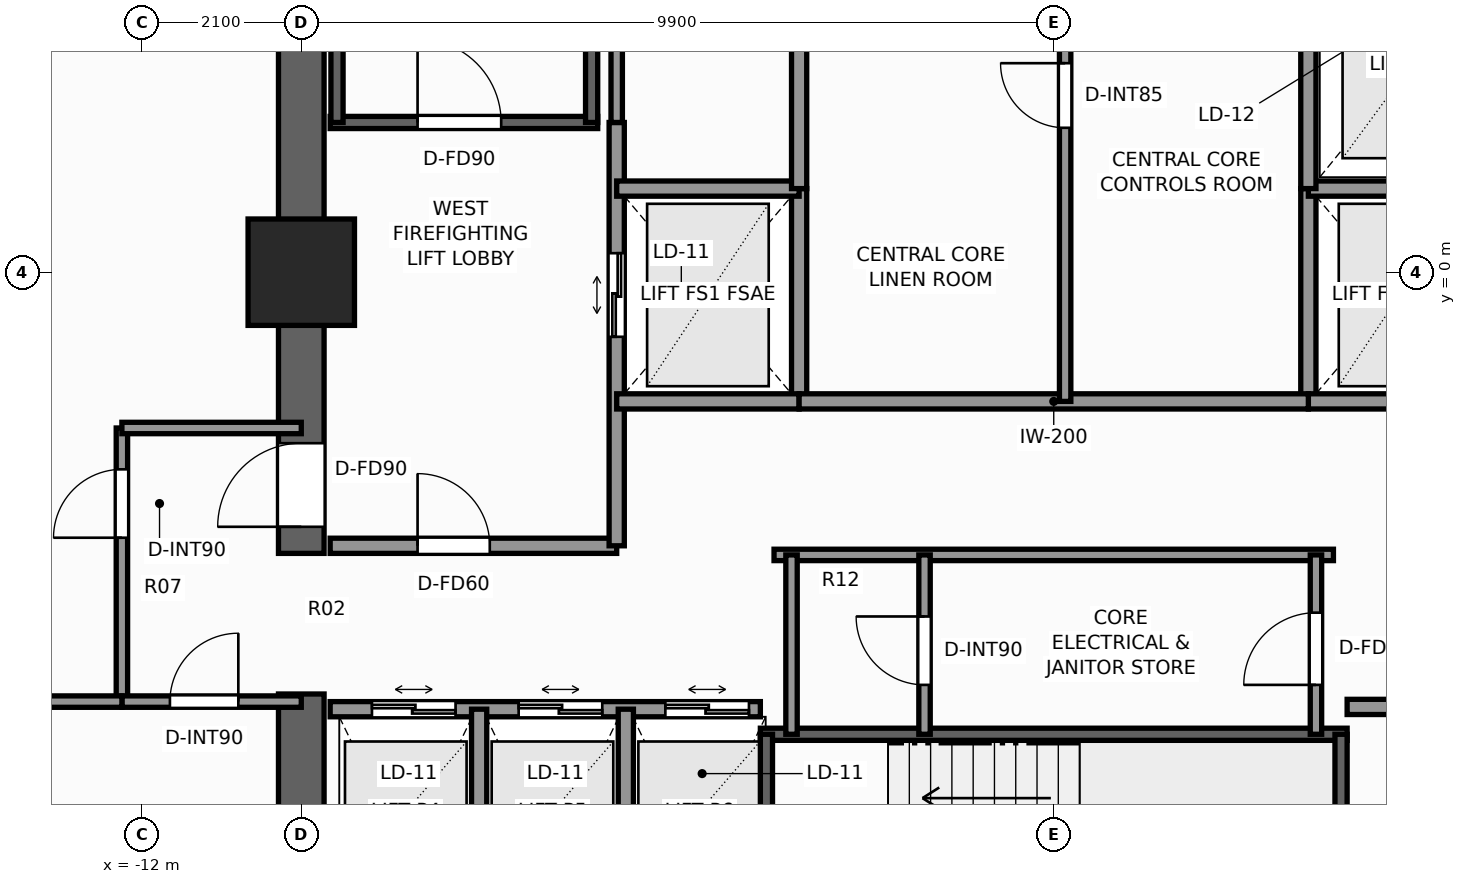
"""IFC4 building model, lengths in metres.
Left out: names, types, materials, properties, quantities, classifications, styles, units other than length and angle.
Written with IfcOpenShell. Run it as: python <this file> out.ifc"""

import sys

from ifc_helpers import new_model, si_unit, direction, frame, frame_2d, origin, origin_2d, place, context, subcontext, project, spatial, rectangle, extrude, element, fill, save


model = new_model("IFC4")
c1 = context("Model", 3, precision=1e-05, world=origin(), true_north=direction((0.0, 1.0)))
c2 = subcontext(c1, "Body", "Model", "MODEL_VIEW")
j1 = project(units=[si_unit("LENGTHUNIT", "METRE"), si_unit("PLANEANGLEUNIT", "RADIAN")], contexts=[c1])
p1 = place(None, origin())
s1 = spatial("IfcSite", under=j1, at=p1, CompositionType="ELEMENT")
p2 = place(p1, origin())
s2 = spatial("IfcBuilding", under=s1, at=p2, CompositionType="ELEMENT")
p3 = place(p2, frame((0.0, 0.0, 101.9)))
s3 = spatial("IfcBuildingStorey", under=s2, at=p3, CompositionType="ELEMENT", Elevation=101.9)
p4 = place(p3, frame((-9.9, -9.6, 0.0), z_axis=(0.0, 0.0, 1.0), x_axis=(0.0, 1.0, 0.0)))
e1 = element("IfcWall", 1, at=p4, inside=s3, PredefinedType="SHEAR", context=c2, shape_type="SweptSolid", body=[
    extrude(rectangle(XDim=4.05, YDim=0.6, at=frame_2d((2.025, 0.0))), origin(), (0.0, 0.0, 1.0), 3.3),
])
p5 = place(p3, frame((-9.9, -3.7, 0.0), z_axis=(0.0, 0.0, 1.0), x_axis=(0.0, 1.0, 0.0)))
e2 = element("IfcWall", 2, at=p5, inside=s3, PredefinedType="SHEAR", context=c2, shape_type="SweptSolid", body=[
    extrude(rectangle(XDim=13.3, YDim=0.6, at=frame_2d((6.65, 0.0))), origin(), (0.0, 0.0, 1.0), 3.3),
])
p6 = place(p5, frame((0.35, 0.0, 0.0)))
e3 = element("IfcOpeningElement", 3, at=p6, cuts=e2, PredefinedType="OPENING", context=c2, shape_type="SweptSolid", body=[
    extrude(rectangle(XDim=1.1, YDim=2.2, at=frame_2d((0.55, 1.1))), frame((0.0, 0.31, 0.0), z_axis=(0.0, -1.0, 0.0), x_axis=(1.0, 0.0, 0.0)), (0.0, 0.0, 1.0), 0.62),
])
p7 = place(p3, frame((-9.9, 0.0, 0.0), z_axis=(0.0, 0.0, 1.0), x_axis=(1.0, 0.0, 0.0)))
e4 = element("IfcColumn", 4, at=p7, inside=s3, PredefinedType="COLUMN", context=c2, shape_type="SweptSolid", body=[
    extrude(rectangle(XDim=1.4, YDim=1.4, at=origin_2d()), origin(), (0.0, 0.0, 1.0), 3.3),
])
p8 = place(p3, frame((-9.52, 1.97, 0.0), z_axis=(0.0, 0.0, 1.0), x_axis=(1.0, 0.0, 0.0)))
e5 = element("IfcWall", 5, at=p8, inside=s3, PredefinedType="SHEAR", context=c2, shape_type="SweptSolid", body=[
    extrude(rectangle(XDim=3.52, YDim=0.16, at=frame_2d((1.76, 0.0))), origin(), (0.0, 0.0, 1.0), 3.3),
])
p9 = place(p8, frame((1.15, 0.0, 0.0)))
e6 = element("IfcOpeningElement", 6, at=p9, cuts=e5, PredefinedType="OPENING", context=c2, shape_type="SweptSolid", body=[
    extrude(rectangle(XDim=1.1, YDim=2.2, at=frame_2d((0.55, 1.1))), frame((0.0, 0.09, 0.0), z_axis=(0.0, -1.0, 0.0), x_axis=(1.0, 0.0, 0.0)), (0.0, 0.0, 1.0), 0.18),
])
for number, where, z_axis, x_axis in (
    (7, (-9.43, 1.97, 0.0), (0.0, 0.0, 1.0), (0.0, 1.0, 0.0)),
    (8, (-6.08, 1.97, 0.0), (0.0, 0.0, 1.0), (0.0, 1.0, 0.0)),
):
    element("IfcWall", number, at=place(p3, frame(where, z_axis=z_axis, x_axis=x_axis)), inside=s3, PredefinedType="SHEAR", context=c2, shape_type="SweptSolid", body=[
        extrude(rectangle(XDim=7.56, YDim=0.16, at=frame_2d((3.78, 0.0))), origin(), (0.0, 0.0, 1.0), 3.3),
    ])
p10 = place(p3, frame((-3.86, -6.08, 0.0), z_axis=(0.0, 0.0, 1.0), x_axis=(1.0, 0.0, 0.0)))
e9 = element("IfcWall", 9, at=p10, inside=s3, PredefinedType="SHEAR", context=c2, shape_type="SweptSolid", body=[
    extrude(rectangle(XDim=7.72, YDim=0.16, at=frame_2d((3.86, 0.0))), origin(), (0.0, 0.0, 1.0), 3.3),
])
for number, where, z_axis, x_axis in (
    (10, (-3.78, -9.43, 0.0), (0.0, 0.0, 1.0), (0.0, 1.0, 0.0)),
    (11, (3.78, -9.43, 0.0), (0.0, 0.0, 1.0), (0.0, 1.0, 0.0)),
):
    element("IfcWall", number, at=place(p3, frame(where, z_axis=z_axis, x_axis=x_axis)), inside=s3, PredefinedType="SHEAR", context=c2, shape_type="SweptSolid", body=[
        extrude(rectangle(XDim=3.35, YDim=0.16, at=frame_2d((1.675, 0.0))), origin(), (0.0, 0.0, 1.0), 3.3),
    ])
p11 = place(p3, frame((-9.52, -3.6, 0.0), z_axis=(0.0, 0.0, 1.0), x_axis=(1.0, 0.0, 0.0)))
e12 = element("IfcWall", 12, at=p11, inside=s3, PredefinedType="SOLIDWALL", context=c2, shape_type="SweptSolid", body=[
    extrude(rectangle(XDim=3.77, YDim=0.2, at=frame_2d((1.885, 0.0))), origin(), (0.0, 0.0, 1.0), 3.08),
])
p12 = place(p11, frame((1.15, 0.0, 0.0)))
e13 = element("IfcOpeningElement", 13, at=p12, cuts=e12, PredefinedType="OPENING", context=c2, shape_type="SweptSolid", body=[
    extrude(rectangle(XDim=0.95, YDim=2.06, at=frame_2d((0.475, 1.03))), frame((0.0, 0.11, 0.0), z_axis=(0.0, -1.0, 0.0), x_axis=(1.0, 0.0, 0.0)), (0.0, 0.0, 1.0), 0.22),
])
p13 = place(p3, frame((-5.75, -3.6, 0.0), z_axis=(0.0, 0.0, 1.0), x_axis=(0.0, 1.0, 0.0)))
e14 = element("IfcWall", 14, at=p13, inside=s3, PredefinedType="SOLIDWALL", context=c2, shape_type="SweptSolid", body=[
    extrude(rectangle(XDim=5.57, YDim=0.2, at=frame_2d((2.785, 0.0))), origin(), (0.0, 0.0, 1.0), 3.08),
])
p14 = place(p13, frame((2.75, 0.0, 0.0)))
e15 = element("IfcOpeningElement", 15, at=p14, cuts=e14, PredefinedType="OPENING", context=c2, shape_type="SweptSolid", body=[
    extrude(rectangle(XDim=1.1, YDim=2.2, at=frame_2d((0.55, 1.1))), frame((0.0, 0.11, 0.0), z_axis=(0.0, -1.0, 0.0), x_axis=(1.0, 0.0, 0.0)), (0.0, 0.0, 1.0), 0.22),
])
p15 = place(p3, frame((-3.35, -1.7, 0.0), z_axis=(0.0, 0.0, 1.0), x_axis=(0.0, 1.0, 0.0)))
e16 = element("IfcWall", 16, at=p15, inside=s3, PredefinedType="SOLIDWALL", context=c2, shape_type="SweptSolid", body=[
    extrude(rectangle(XDim=2.8, YDim=0.2, at=frame_2d((1.4, 0.0))), origin(), (0.0, 0.0, 1.0), 3.08),
])
for number, where, z_axis, x_axis in (
    (17, (-5.75, -1.7, 0.0), (0.0, 0.0, 1.0), (1.0, 0.0, 0.0)),
    (18, (-5.75, 1.1, 0.0), (0.0, 0.0, 1.0), (1.0, 0.0, 0.0)),
):
    element("IfcWall", number, at=place(p3, frame(where, z_axis=z_axis, x_axis=x_axis)), inside=s3, PredefinedType="SOLIDWALL", context=c2, shape_type="SweptSolid", body=[
        extrude(rectangle(XDim=2.4, YDim=0.2, at=frame_2d((1.2, 0.0))), origin(), (0.0, 0.0, 1.0), 3.08),
    ])
p16 = place(p3, frame((3.35, -1.7, 0.0), z_axis=(0.0, 0.0, 1.0), x_axis=(0.0, 1.0, 0.0)))
e19 = element("IfcWall", 19, at=p16, inside=s3, PredefinedType="SOLIDWALL", context=c2, shape_type="SweptSolid", body=[
    extrude(rectangle(XDim=2.8, YDim=0.2, at=frame_2d((1.4, 0.0))), origin(), (0.0, 0.0, 1.0), 3.08),
])
for number, where, z_axis, x_axis in (
    (20, (3.35, -1.7, 0.0), (0.0, 0.0, 1.0), (1.0, 0.0, 0.0)),
    (21, (3.35, 1.1, 0.0), (0.0, 0.0, 1.0), (1.0, 0.0, 0.0)),
):
    element("IfcWall", number, at=place(p3, frame(where, z_axis=z_axis, x_axis=x_axis)), inside=s3, PredefinedType="SOLIDWALL", context=c2, shape_type="SweptSolid", body=[
        extrude(rectangle(XDim=2.4, YDim=0.2, at=frame_2d((1.2, 0.0))), origin(), (0.0, 0.0, 1.0), 3.08),
    ])
p17 = place(p3, frame((-9.52, -5.75, 0.0), z_axis=(0.0, 0.0, 1.0), x_axis=(1.0, 0.0, 0.0)))
e22 = element("IfcWall", 22, at=p17, inside=s3, PredefinedType="SOLIDWALL", context=c2, shape_type="SweptSolid", body=[
    extrude(rectangle(XDim=5.66, YDim=0.2, at=frame_2d((2.83, 0.0))), origin(), (0.0, 0.0, 1.0), 3.08),
])
p18 = place(p17, frame((0.55, 0.0, 0.0)))
e23 = element("IfcOpeningElement", 23, at=p18, cuts=e22, PredefinedType="OPENING", context=c2, shape_type="SweptSolid", body=[
    extrude(rectangle(XDim=1.1, YDim=2.2, at=frame_2d((0.55, 1.1))), frame((0.0, 0.11, 0.0), z_axis=(0.0, -1.0, 0.0), x_axis=(1.0, 0.0, 0.0)), (0.0, 0.0, 1.0), 0.22),
])
p19 = place(p17, frame((2.48, 0.0, 0.0)))
e24 = element("IfcOpeningElement", 24, at=p19, cuts=e22, PredefinedType="OPENING", context=c2, shape_type="SweptSolid", body=[
    extrude(rectangle(XDim=1.1, YDim=2.2, at=frame_2d((0.55, 1.1))), frame((0.0, 0.11, 0.0), z_axis=(0.0, -1.0, 0.0), x_axis=(1.0, 0.0, 0.0)), (0.0, 0.0, 1.0), 0.22),
])
p20 = place(p17, frame((4.41, 0.0, 0.0)))
e25 = element("IfcOpeningElement", 25, at=p20, cuts=e22, PredefinedType="OPENING", context=c2, shape_type="SweptSolid", body=[
    extrude(rectangle(XDim=1.1, YDim=2.2, at=frame_2d((0.55, 1.1))), frame((0.0, 0.11, 0.0), z_axis=(0.0, -1.0, 0.0), x_axis=(1.0, 0.0, 0.0)), (0.0, 0.0, 1.0), 0.22),
])
for number, where, z_axis, x_axis in (
    (26, (-7.56, -9.52, 0.0), (0.0, 0.0, 1.0), (0.0, 1.0, 0.0)),
    (27, (-5.63, -9.52, 0.0), (0.0, 0.0, 1.0), (0.0, 1.0, 0.0)),
):
    element("IfcWall", number, at=place(p3, frame(where, z_axis=z_axis, x_axis=x_axis)), inside=s3, PredefinedType="SOLIDWALL", context=c2, shape_type="SweptSolid", body=[
        extrude(rectangle(XDim=3.77, YDim=0.2, at=frame_2d((1.885, 0.0))), origin(), (0.0, 0.0, 1.0), 3.08),
    ])
p21 = place(p3, frame((3.86, -5.72, 0.0), z_axis=(0.0, 0.0, 1.0), x_axis=(1.0, 0.0, 0.0)))
e28 = element("IfcWall", 28, at=p21, inside=s3, PredefinedType="SOLIDWALL", context=c2, shape_type="SweptSolid", body=[
    extrude(rectangle(XDim=5.66, YDim=0.2, at=frame_2d((2.83, 0.0))), origin(), (0.0, 0.0, 1.0), 3.08),
])
p22 = place(p21, frame((1.2, 0.0, 0.0)))
e29 = element("IfcOpeningElement", 29, at=p22, cuts=e28, PredefinedType="OPENING", context=c2, shape_type="SweptSolid", body=[
    extrude(rectangle(XDim=0.95, YDim=2.06, at=frame_2d((0.475, 1.03))), frame((0.0, 0.11, 0.0), z_axis=(0.0, -1.0, 0.0), x_axis=(1.0, 0.0, 0.0)), (0.0, 0.0, 1.0), 0.22),
])
p23 = place(p3, frame((-3.35, -1.7, 0.0), z_axis=(0.0, 0.0, 1.0), x_axis=(1.0, 0.0, 0.0)))
e30 = element("IfcWall", 30, at=p23, inside=s3, PredefinedType="SOLIDWALL", context=c2, shape_type="SweptSolid", body=[
    extrude(rectangle(XDim=6.7, YDim=0.2, at=frame_2d((3.35, 0.0))), origin(), (0.0, 0.0, 1.0), 3.08),
])
for number, where, z_axis, x_axis in (
    (31, (-3.35, 1.1, 0.0), (0.0, 0.0, 1.0), (0.0, 1.0, 0.0)),
    (32, (3.35, 1.1, 0.0), (0.0, 0.0, 1.0), (0.0, 1.0, 0.0)),
):
    element("IfcWall", number, at=place(p3, frame(where, z_axis=z_axis, x_axis=x_axis)), inside=s3, PredefinedType="SOLIDWALL", context=c2, shape_type="SweptSolid", body=[
        extrude(rectangle(XDim=3.2, YDim=0.2, at=frame_2d((1.6, 0.0))), origin(), (0.0, 0.0, 1.0), 3.08),
    ])
p24 = place(p3, frame((0.15, -1.7, 0.0), z_axis=(0.0, 0.0, 1.0), x_axis=(0.0, 1.0, 0.0)))
e33 = element("IfcWall", 33, at=p24, inside=s3, PredefinedType="PARTITIONING", context=c2, shape_type="SweptSolid", body=[
    extrude(rectangle(XDim=6.0, YDim=0.15, at=frame_2d((3.0, 0.0))), origin(), (0.0, 0.0, 1.0), 3.08),
])
p25 = place(p24, frame((3.6, 0.0, 0.0)))
e34 = element("IfcOpeningElement", 34, at=p25, cuts=e33, PredefinedType="OPENING", context=c2, shape_type="SweptSolid", body=[
    extrude(rectangle(XDim=0.85, YDim=2.03, at=frame_2d((0.425, 1.015))), frame((0.0, 0.085, 0.0), z_axis=(0.0, -1.0, 0.0), x_axis=(1.0, 0.0, 0.0)), (0.0, 0.0, 1.0), 0.17),
])
p26 = place(p3, frame((-3.68, -3.72, 0.0), z_axis=(0.0, 0.0, 1.0), x_axis=(1.0, 0.0, 0.0)))
e35 = element("IfcWall", 35, at=p26, inside=s3, PredefinedType="PARTITIONING", context=c2, shape_type="SweptSolid", body=[
    extrude(rectangle(XDim=7.36, YDim=0.15, at=frame_2d((3.68, 0.0))), origin(), (0.0, 0.0, 1.0), 3.08),
])
p27 = place(p3, frame((3.45, -6.08, 0.0), z_axis=(0.0, 0.0, 1.0), x_axis=(0.0, 1.0, 0.0)))
e36 = element("IfcWall", 36, at=p27, inside=s3, PredefinedType="PARTITIONING", context=c2, shape_type="SweptSolid", body=[
    extrude(rectangle(XDim=2.36, YDim=0.15, at=frame_2d((1.18, 0.0))), origin(), (0.0, 0.0, 1.0), 3.08),
])
p28 = place(p27, frame((0.65, 0.0, 0.0)))
e37 = element("IfcOpeningElement", 37, at=p28, cuts=e36, PredefinedType="OPENING", context=c2, shape_type="SweptSolid", body=[
    extrude(rectangle(XDim=0.95, YDim=2.06, at=frame_2d((0.475, 1.03))), frame((0.0, 0.085, 0.0), z_axis=(0.0, -1.0, 0.0), x_axis=(1.0, 0.0, 0.0)), (0.0, 0.0, 1.0), 0.17),
])
p29 = place(p3, frame((-3.45, -6.08, 0.0), z_axis=(0.0, 0.0, 1.0), x_axis=(0.0, 1.0, 0.0)))
e38 = element("IfcWall", 38, at=p29, inside=s3, PredefinedType="PARTITIONING", context=c2, shape_type="SweptSolid", body=[
    extrude(rectangle(XDim=2.36, YDim=0.15, at=frame_2d((1.18, 0.0))), origin(), (0.0, 0.0, 1.0), 3.08),
])
p30 = place(p3, frame((-1.7, -6.08, 0.0), z_axis=(0.0, 0.0, 1.0), x_axis=(0.0, 1.0, 0.0)))
e39 = element("IfcWall", 39, at=p30, inside=s3, PredefinedType="PARTITIONING", context=c2, shape_type="SweptSolid", body=[
    extrude(rectangle(XDim=2.36, YDim=0.15, at=frame_2d((1.18, 0.0))), origin(), (0.0, 0.0, 1.0), 3.08),
])
p31 = place(p30, frame((0.65, 0.0, 0.0)))
e40 = element("IfcOpeningElement", 40, at=p31, cuts=e39, PredefinedType="OPENING", context=c2, shape_type="SweptSolid", body=[
    extrude(rectangle(XDim=0.9, YDim=2.06, at=frame_2d((0.45, 1.03))), frame((0.0, 0.085, 0.0), z_axis=(0.0, -1.0, 0.0), x_axis=(1.0, 0.0, 0.0)), (0.0, 0.0, 1.0), 0.17),
])
p32 = place(p3, frame((-5.75, 1.97, 0.0), z_axis=(0.0, 0.0, 1.0), x_axis=(0.0, 1.0, 0.0)))
e41 = element("IfcWall", 41, at=p32, inside=s3, PredefinedType="PARTITIONING", context=c2, shape_type="SweptSolid", body=[
    extrude(rectangle(XDim=2.33, YDim=0.15, at=frame_2d((1.165, 0.0))), origin(), (0.0, 0.0, 1.0), 3.08),
])
p33 = place(p3, frame((-12.26, -5.65, 0.0), z_axis=(0.0, 0.0, 1.0), x_axis=(0.0, 1.0, 0.0)))
e42 = element("IfcWall", 42, at=p33, inside=s3, PredefinedType="PARTITIONING", context=c2, shape_type="SweptSolid", body=[
    extrude(rectangle(XDim=3.6, YDim=0.15, at=frame_2d((1.8, 0.0))), origin(), (0.0, 0.0, 1.0), 2.292),
])
p34 = place(p33, frame((2.156, 0.0, 0.0)))
e43 = element("IfcOpeningElement", 43, at=p34, cuts=e42, PredefinedType="OPENING", context=c2, shape_type="SweptSolid", body=[
    extrude(rectangle(XDim=0.9, YDim=2.06, at=frame_2d((0.45, 1.03))), frame((0.0, 0.085, 0.0), z_axis=(0.0, -1.0, 0.0), x_axis=(1.0, 0.0, 0.0)), (0.0, 0.0, 1.0), 0.17),
])
p35 = place(p3, frame((-12.26, -2.05, 0.0), z_axis=(0.0, 0.0, 1.0), x_axis=(1.0, 0.0, 0.0)))
e44 = element("IfcWall", 44, at=p35, inside=s3, PredefinedType="PARTITIONING", context=c2, shape_type="SweptSolid", body=[
    extrude(rectangle(XDim=2.36, YDim=0.15, at=frame_2d((1.18, 0.0))), origin(), (0.0, 0.0, 1.0), 3.08),
])
p36 = place(p3, frame((-12.26, -5.65, 0.0), z_axis=(0.0, 0.0, 1.0), x_axis=(1.0, 0.0, 0.0)))
e45 = element("IfcWall", 45, at=p36, inside=s3, PredefinedType="PARTITIONING", context=c2, shape_type="SweptSolid", body=[
    extrude(rectangle(XDim=2.36, YDim=0.15, at=frame_2d((1.18, 0.0))), origin(), (0.0, 0.0, 1.0), 3.08),
])
p37 = place(p36, frame((0.632, 0.0, 0.0)))
e46 = element("IfcOpeningElement", 46, at=p37, cuts=e45, PredefinedType="OPENING", context=c2, shape_type="SweptSolid", body=[
    extrude(rectangle(XDim=0.9, YDim=2.06, at=frame_2d((0.45, 1.03))), frame((0.0, 0.085, 0.0), z_axis=(0.0, -1.0, 0.0), x_axis=(1.0, 0.0, 0.0)), (0.0, 0.0, 1.0), 0.17),
])
p38 = place(p3, frame((-20.38, -5.65, 0.0), z_axis=(0.0, 0.0, 1.0), x_axis=(1.0, 0.0, 0.0)))
e47 = element("IfcWall", 47, at=p38, inside=s3, PredefinedType="PARTITIONING", context=c2, shape_type="SweptSolid", body=[
    extrude(rectangle(XDim=8.12, YDim=0.15, at=frame_2d((4.06, 0.0))), origin(), (0.0, 0.0, 1.0), 2.449),
])
p39 = place(p9, origin())
e48 = element("IfcDoor", 48, at=p39, inside=s3, OperationType="SINGLE_SWING_LEFT", PredefinedType="DOOR", context=c2, shape_type="SweptSolid", body=[
    extrude(rectangle(XDim=1.1, YDim=2.2, at=frame_2d((0.55, 1.1))), frame((0.0, 0.025, 0.0), z_axis=(0.0, -1.0, 0.0), x_axis=(1.0, 0.0, 0.0)), (0.0, 0.0, 1.0), 0.05),
])
fill(e6, e48)
p40 = place(p6, origin())
e49 = element("IfcDoor", 49, at=p40, inside=s3, OperationType="SINGLE_SWING_LEFT", PredefinedType="DOOR", context=c2, shape_type="SweptSolid", body=[
    extrude(rectangle(XDim=1.1, YDim=2.2, at=frame_2d((0.55, 1.1))), frame((0.0, 0.025, 0.0), z_axis=(0.0, -1.0, 0.0), x_axis=(1.0, 0.0, 0.0)), (0.0, 0.0, 1.0), 0.05),
])
fill(e3, e49)
p41 = place(p14, origin())
e50 = element("IfcDoor", 50, at=p41, inside=s3, OperationType="DOUBLE_DOOR_SLIDING", PredefinedType="DOOR", context=c2, shape_type="SweptSolid", body=[
    extrude(rectangle(XDim=1.1, YDim=2.2, at=frame_2d((0.55, 1.1))), frame((0.0, 0.025, 0.0), z_axis=(0.0, -1.0, 0.0), x_axis=(1.0, 0.0, 0.0)), (0.0, 0.0, 1.0), 0.05),
])
fill(e15, e50)
p42 = place(p18, origin())
e51 = element("IfcDoor", 51, at=p42, inside=s3, OperationType="DOUBLE_DOOR_SLIDING", PredefinedType="DOOR", context=c2, shape_type="SweptSolid", body=[
    extrude(rectangle(XDim=1.1, YDim=2.2, at=frame_2d((0.55, 1.1))), frame((0.0, 0.025, 0.0), z_axis=(0.0, -1.0, 0.0), x_axis=(1.0, 0.0, 0.0)), (0.0, 0.0, 1.0), 0.05),
])
fill(e23, e51)
p43 = place(p19, origin())
e52 = element("IfcDoor", 52, at=p43, inside=s3, OperationType="DOUBLE_DOOR_SLIDING", PredefinedType="DOOR", context=c2, shape_type="SweptSolid", body=[
    extrude(rectangle(XDim=1.1, YDim=2.2, at=frame_2d((0.55, 1.1))), frame((0.0, 0.025, 0.0), z_axis=(0.0, -1.0, 0.0), x_axis=(1.0, 0.0, 0.0)), (0.0, 0.0, 1.0), 0.05),
])
fill(e24, e52)
p44 = place(p20, origin())
e53 = element("IfcDoor", 53, at=p44, inside=s3, OperationType="DOUBLE_DOOR_SLIDING", PredefinedType="DOOR", context=c2, shape_type="SweptSolid", body=[
    extrude(rectangle(XDim=1.1, YDim=2.2, at=frame_2d((0.55, 1.1))), frame((0.0, 0.025, 0.0), z_axis=(0.0, -1.0, 0.0), x_axis=(1.0, 0.0, 0.0)), (0.0, 0.0, 1.0), 0.05),
])
fill(e25, e53)
p45 = place(p12, origin())
e54 = element("IfcDoor", 54, at=p45, inside=s3, OperationType="SINGLE_SWING_LEFT", PredefinedType="DOOR", context=c2, shape_type="SweptSolid", body=[
    extrude(rectangle(XDim=0.95, YDim=2.06, at=frame_2d((0.475, 1.03))), frame((0.0, 0.025, 0.0), z_axis=(0.0, -1.0, 0.0), x_axis=(1.0, 0.0, 0.0)), (0.0, 0.0, 1.0), 0.05),
])
fill(e13, e54)
p46 = place(p25, origin())
e55 = element("IfcDoor", 55, at=p46, inside=s3, OperationType="SINGLE_SWING_RIGHT", PredefinedType="DOOR", context=c2, shape_type="SweptSolid", body=[
    extrude(rectangle(XDim=0.85, YDim=2.03, at=frame_2d((0.425, 1.015))), frame((0.0, 0.025, 0.0), z_axis=(0.0, -1.0, 0.0), x_axis=(1.0, 0.0, 0.0)), (0.0, 0.0, 1.0), 0.05),
])
fill(e34, e55)
p47 = place(p28, origin())
e56 = element("IfcDoor", 56, at=p47, inside=s3, OperationType="SINGLE_SWING_LEFT", PredefinedType="DOOR", context=c2, shape_type="SweptSolid", body=[
    extrude(rectangle(XDim=0.95, YDim=2.06, at=frame_2d((0.475, 1.03))), frame((0.0, 0.025, 0.0), z_axis=(0.0, -1.0, 0.0), x_axis=(1.0, 0.0, 0.0)), (0.0, 0.0, 1.0), 0.05),
])
fill(e37, e56)
p48 = place(p31, origin())
e57 = element("IfcDoor", 57, at=p48, inside=s3, OperationType="SINGLE_SWING_RIGHT", PredefinedType="DOOR", context=c2, shape_type="SweptSolid", body=[
    extrude(rectangle(XDim=0.9, YDim=2.06, at=frame_2d((0.45, 1.03))), frame((0.0, 0.025, 0.0), z_axis=(0.0, -1.0, 0.0), x_axis=(1.0, 0.0, 0.0)), (0.0, 0.0, 1.0), 0.05),
])
fill(e40, e57)
p49 = place(p34, origin())
e58 = element("IfcDoor", 58, at=p49, inside=s3, OperationType="SINGLE_SWING_LEFT", PredefinedType="DOOR", context=c2, shape_type="SweptSolid", body=[
    extrude(rectangle(XDim=0.9, YDim=2.06, at=frame_2d((0.45, 1.03))), frame((0.0, 0.025, 0.0), z_axis=(0.0, -1.0, 0.0), x_axis=(1.0, 0.0, 0.0)), (0.0, 0.0, 1.0), 0.05),
])
fill(e43, e58)
p50 = place(p37, origin())
e59 = element("IfcDoor", 59, at=p50, inside=s3, OperationType="SINGLE_SWING_RIGHT", PredefinedType="DOOR", context=c2, shape_type="SweptSolid", body=[
    extrude(rectangle(XDim=0.9, YDim=2.06, at=frame_2d((0.45, 1.03))), frame((0.0, 0.025, 0.0), z_axis=(0.0, -1.0, 0.0), x_axis=(1.0, 0.0, 0.0)), (0.0, 0.0, 1.0), 0.05),
])
fill(e46, e59)
save(model, sys.argv[1])
